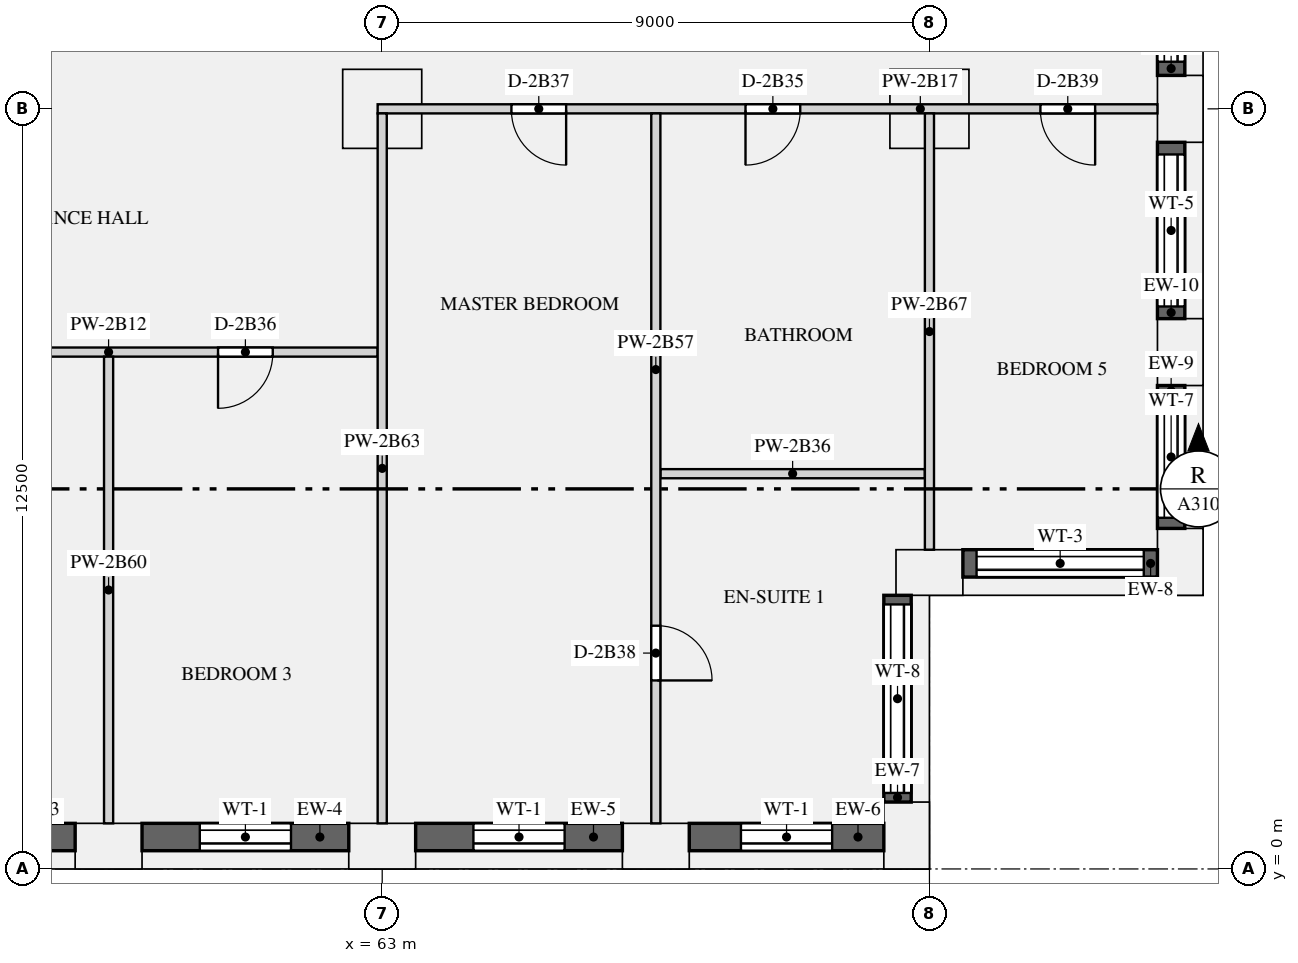
"""IFC4 building model, lengths in metres.
Left out: names, types, materials, properties, quantities, classifications, styles, units other than length and angle.
Written with IfcOpenShell. Run it as: python <this file> out.ifc"""

import sys

from ifc_helpers import new_model, si_unit, direction, frame, frame_2d, origin, origin_2d, place, context, subcontext, project, spatial, rectangle, extrude, element, fill, save


model = new_model("IFC4")
c1 = context("Model", 3, precision=1e-05, world=origin(), true_north=direction((0.0, 1.0)))
c2 = subcontext(c1, "Body", "Model", "MODEL_VIEW")
j1 = project(units=[si_unit("LENGTHUNIT", "METRE"), si_unit("PLANEANGLEUNIT", "RADIAN")], contexts=[c1])
p1 = place(None, origin())
s1 = spatial("IfcSite", under=j1, at=p1, CompositionType="ELEMENT")
p2 = place(p1, origin())
s2 = spatial("IfcBuilding", under=s1, at=p2, CompositionType="ELEMENT")
p3 = place(p2, frame((0.0, 0.0, 93.0)))
s3 = spatial("IfcBuildingStorey", under=s2, at=p3, CompositionType="ELEMENT", Elevation=93.0)
for number, where, z_axis, x_axis in (
    (1, (58.5, 0.375, 0.0), (0.0, 0.0, 1.0), (1.0, 0.0, 0.0)),
    (2, (63.0, 0.375, 0.0), (0.0, 0.0, 1.0), (1.0, 0.0, 0.0)),
    (3, (67.5, 0.375, 0.0), (0.0, 0.0, 1.0), (1.0, 0.0, 0.0)),
    (4, (71.625, 0.55, 0.0), (0.0, 0.0, 1.0), (0.0, 1.0, 0.0)),
    (5, (72.0, 4.875, 0.0), (0.0, 0.0, 1.0), (1.0, 0.0, 0.0)),
    (6, (76.125, 5.05, 0.0), (0.0, 0.0, 1.0), (0.0, 1.0, 0.0)),
    (7, (76.125, 8.5, 0.0), (0.0, 0.0, 1.0), (0.0, 1.0, 0.0)),
    (8, (76.125, 12.5, 0.0), (0.0, 0.0, 1.0), (0.0, 1.0, 0.0)),
):
    element("IfcColumn", number, at=place(p3, frame(where, z_axis=z_axis, x_axis=x_axis)), inside=s3, PredefinedType="USERDEFINED", context=c2, shape_type="SweptSolid", body=[
        extrude(rectangle(XDim=1.1, YDim=0.75, at=origin_2d()), origin(), (0.0, 0.0, 1.0), 3.15),
    ])
for number, where, z_axis, x_axis in (
    (9, (63.0, 12.5, 0.0), (0.0, 0.0, 1.0), (1.0, 0.0, 0.0)),
    (10, (72.0, 12.5, 0.0), (0.0, 0.0, 1.0), (1.0, 0.0, 0.0)),
):
    element("IfcColumn", number, at=place(p3, frame(where, z_axis=z_axis, x_axis=x_axis)), inside=s3, PredefinedType="COLUMN", context=c2, shape_type="SweptSolid", body=[
        extrude(rectangle(XDim=1.3, YDim=1.3, at=origin_2d()), origin(), (0.0, 0.0, 1.0), 3.15),
    ])
p4 = place(p3, frame((54.0, 0.525, 0.9), z_axis=(0.0, 0.0, 1.0), x_axis=(1.0, 0.0, 0.0)))
e11 = element("IfcWall", 11, at=p4, inside=s3, PredefinedType="SOLIDWALL", context=c2, shape_type="SweptSolid", body=[
    extrude(rectangle(XDim=3.95, YDim=0.45, at=frame_2d((1.975, 0.0))), origin(), (0.0, 0.0, 1.0), 1.93),
])
p5 = place(p4, frame((1.225, 0.0, 0.15)))
e12 = element("IfcOpeningElement", 12, at=p5, cuts=e11, PredefinedType="OPENING", context=c2, shape_type="SweptSolid", body=[
    extrude(rectangle(XDim=1.5, YDim=1.5, at=frame_2d((0.75, 0.75))), frame((0.0, 0.235, 0.0), z_axis=(0.0, -1.0, 0.0), x_axis=(1.0, 0.0, 0.0)), (0.0, 0.0, 1.0), 0.47),
])
p6 = place(p3, frame((59.05, 0.525, 0.9), z_axis=(0.0, 0.0, 1.0), x_axis=(1.0, 0.0, 0.0)))
e13 = element("IfcWall", 13, at=p6, inside=s3, PredefinedType="SOLIDWALL", context=c2, shape_type="SweptSolid", body=[
    extrude(rectangle(XDim=3.4, YDim=0.45, at=frame_2d((1.7, 0.0))), origin(), (0.0, 0.0, 1.0), 1.93),
])
p7 = place(p6, frame((0.95, 0.0, 0.15)))
e14 = element("IfcOpeningElement", 14, at=p7, cuts=e13, PredefinedType="OPENING", context=c2, shape_type="SweptSolid", body=[
    extrude(rectangle(XDim=1.5, YDim=1.5, at=frame_2d((0.75, 0.75))), frame((0.0, 0.235, 0.0), z_axis=(0.0, -1.0, 0.0), x_axis=(1.0, 0.0, 0.0)), (0.0, 0.0, 1.0), 0.47),
])
p8 = place(p3, frame((63.55, 0.525, 0.9), z_axis=(0.0, 0.0, 1.0), x_axis=(1.0, 0.0, 0.0)))
e15 = element("IfcWall", 15, at=p8, inside=s3, PredefinedType="SOLIDWALL", context=c2, shape_type="SweptSolid", body=[
    extrude(rectangle(XDim=3.4, YDim=0.45, at=frame_2d((1.7, 0.0))), origin(), (0.0, 0.0, 1.0), 1.93),
])
p9 = place(p8, frame((0.95, 0.0, 0.15)))
e16 = element("IfcOpeningElement", 16, at=p9, cuts=e15, PredefinedType="OPENING", context=c2, shape_type="SweptSolid", body=[
    extrude(rectangle(XDim=1.5, YDim=1.5, at=frame_2d((0.75, 0.75))), frame((0.0, 0.235, 0.0), z_axis=(0.0, -1.0, 0.0), x_axis=(1.0, 0.0, 0.0)), (0.0, 0.0, 1.0), 0.47),
])
p10 = place(p3, frame((68.05, 0.525, 0.9), z_axis=(0.0, 0.0, 1.0), x_axis=(1.0, 0.0, 0.0)))
e17 = element("IfcWall", 17, at=p10, inside=s3, PredefinedType="SOLIDWALL", context=c2, shape_type="SweptSolid", body=[
    extrude(rectangle(XDim=3.2, YDim=0.45, at=frame_2d((1.6, 0.0))), origin(), (0.0, 0.0, 1.0), 1.93),
])
p11 = place(p10, frame((0.85, 0.0, 0.15)))
e18 = element("IfcOpeningElement", 18, at=p11, cuts=e17, PredefinedType="OPENING", context=c2, shape_type="SweptSolid", body=[
    extrude(rectangle(XDim=1.5, YDim=1.5, at=frame_2d((0.75, 0.75))), frame((0.0, 0.235, 0.0), z_axis=(0.0, -1.0, 0.0), x_axis=(1.0, 0.0, 0.0)), (0.0, 0.0, 1.0), 0.47),
])
p12 = place(p3, frame((71.475, 1.1, 0.9), z_axis=(0.0, 0.0, 1.0), x_axis=(0.0, 1.0, 0.0)))
e19 = element("IfcWall", 19, at=p12, inside=s3, PredefinedType="SOLIDWALL", context=c2, shape_type="SweptSolid", body=[
    extrude(rectangle(XDim=3.4, YDim=0.45, at=frame_2d((1.7, 0.0))), origin(), (0.0, 0.0, 1.0), 1.93),
])
p13 = place(p12, frame((0.15, 0.0, 0.15)))
e20 = element("IfcOpeningElement", 20, at=p13, cuts=e19, PredefinedType="OPENING", context=c2, shape_type="SweptSolid", body=[
    extrude(rectangle(XDim=3.1, YDim=1.5, at=frame_2d((1.55, 0.75))), frame((0.0, 0.235, 0.0), z_axis=(0.0, -1.0, 0.0), x_axis=(1.0, 0.0, 0.0)), (0.0, 0.0, 1.0), 0.47),
])
p14 = place(p3, frame((72.55, 5.025, 0.9), z_axis=(0.0, 0.0, 1.0), x_axis=(1.0, 0.0, 0.0)))
e21 = element("IfcWall", 21, at=p14, inside=s3, PredefinedType="SOLIDWALL", context=c2, shape_type="SweptSolid", body=[
    extrude(rectangle(XDim=3.2, YDim=0.45, at=frame_2d((1.6, 0.0))), origin(), (0.0, 0.0, 1.0), 1.93),
])
p15 = place(p14, frame((0.225, 0.0, 0.15)))
e22 = element("IfcOpeningElement", 22, at=p15, cuts=e21, PredefinedType="OPENING", context=c2, shape_type="SweptSolid", body=[
    extrude(rectangle(XDim=2.75, YDim=1.5, at=frame_2d((1.375, 0.75))), frame((0.0, 0.235, 0.0), z_axis=(0.0, -1.0, 0.0), x_axis=(1.0, 0.0, 0.0)), (0.0, 0.0, 1.0), 0.47),
])
p16 = place(p3, frame((75.975, 5.6, 0.9), z_axis=(0.0, 0.0, 1.0), x_axis=(0.0, 1.0, 0.0)))
e23 = element("IfcWall", 23, at=p16, inside=s3, PredefinedType="SOLIDWALL", context=c2, shape_type="SweptSolid", body=[
    extrude(rectangle(XDim=2.35, YDim=0.45, at=frame_2d((1.175, 0.0))), origin(), (0.0, 0.0, 1.0), 1.93),
])
p17 = place(p16, frame((0.175, 0.0, 0.15)))
e24 = element("IfcOpeningElement", 24, at=p17, cuts=e23, PredefinedType="OPENING", context=c2, shape_type="SweptSolid", body=[
    extrude(rectangle(XDim=2.0, YDim=1.5, at=frame_2d((1.0, 0.75))), frame((0.0, 0.235, 0.0), z_axis=(0.0, -1.0, 0.0), x_axis=(1.0, 0.0, 0.0)), (0.0, 0.0, 1.0), 0.47),
])
p18 = place(p3, frame((75.975, 9.05, 0.9), z_axis=(0.0, 0.0, 1.0), x_axis=(0.0, 1.0, 0.0)))
e25 = element("IfcWall", 25, at=p18, inside=s3, PredefinedType="SOLIDWALL", context=c2, shape_type="SweptSolid", body=[
    extrude(rectangle(XDim=2.9, YDim=0.45, at=frame_2d((1.45, 0.0))), origin(), (0.0, 0.0, 1.0), 1.93),
])
p19 = place(p18, frame((0.2, 0.0, 0.15)))
e26 = element("IfcOpeningElement", 26, at=p19, cuts=e25, PredefinedType="OPENING", context=c2, shape_type="SweptSolid", body=[
    extrude(rectangle(XDim=2.5, YDim=1.5, at=frame_2d((1.25, 0.75))), frame((0.0, 0.235, 0.0), z_axis=(0.0, -1.0, 0.0), x_axis=(1.0, 0.0, 0.0)), (0.0, 0.0, 1.0), 0.47),
])
p20 = place(p3, frame((75.975, 13.05, 0.9), z_axis=(0.0, 0.0, 1.0), x_axis=(0.0, 1.0, 0.0)))
e27 = element("IfcWall", 27, at=p20, inside=s3, PredefinedType="SOLIDWALL", context=c2, shape_type="SweptSolid", body=[
    extrude(rectangle(XDim=2.7, YDim=0.45, at=frame_2d((1.35, 0.0))), origin(), (0.0, 0.0, 1.0), 1.93),
])
p21 = place(p20, frame((0.225, 0.0, 0.15)))
e28 = element("IfcOpeningElement", 28, at=p21, cuts=e27, PredefinedType="OPENING", context=c2, shape_type="SweptSolid", body=[
    extrude(rectangle(XDim=2.25, YDim=1.5, at=frame_2d((1.125, 0.75))), frame((0.0, 0.235, 0.0), z_axis=(0.0, -1.0, 0.0), x_axis=(1.0, 0.0, 0.0)), (0.0, 0.0, 1.0), 0.47),
])
p22 = place(p3, frame((54.0, 8.5, 0.0), z_axis=(0.0, 0.0, 1.0), x_axis=(1.0, 0.0, 0.0)))
e29 = element("IfcWall", 29, at=p22, inside=s3, PredefinedType="PARTITIONING", context=c2, shape_type="SweptSolid", body=[
    extrude(rectangle(XDim=8.925, YDim=0.15, at=frame_2d((4.462, 0.0))), origin(), (0.0, 0.0, 1.0), 2.83),
])
p23 = place(p22, frame((1.8, 0.0, 0.0)))
e30 = element("IfcOpeningElement", 30, at=p23, cuts=e29, PredefinedType="OPENING", context=c2, shape_type="SweptSolid", body=[
    extrude(rectangle(XDim=0.9, YDim=2.1, at=frame_2d((0.45, 1.05))), frame((0.0, 0.085, 0.0), z_axis=(0.0, -1.0, 0.0), x_axis=(1.0, 0.0, 0.0)), (0.0, 0.0, 1.0), 0.17),
])
p24 = place(p22, frame((6.3, 0.0, 0.0)))
e31 = element("IfcOpeningElement", 31, at=p24, cuts=e29, PredefinedType="OPENING", context=c2, shape_type="SweptSolid", body=[
    extrude(rectangle(XDim=0.9, YDim=2.1, at=frame_2d((0.45, 1.05))), frame((0.0, 0.085, 0.0), z_axis=(0.0, -1.0, 0.0), x_axis=(1.0, 0.0, 0.0)), (0.0, 0.0, 1.0), 0.17),
])
p25 = place(p3, frame((62.925, 12.5, 0.0), z_axis=(0.0, 0.0, 1.0), x_axis=(1.0, 0.0, 0.0)))
e32 = element("IfcWall", 32, at=p25, inside=s3, PredefinedType="PARTITIONING", context=c2, shape_type="SweptSolid", body=[
    extrude(rectangle(XDim=12.825, YDim=0.15, at=frame_2d((6.413, 0.0))), origin(), (0.0, 0.0, 1.0), 2.83),
])
p26 = place(p25, frame((6.05, 0.0, 0.0)))
e33 = element("IfcOpeningElement", 33, at=p26, cuts=e32, PredefinedType="OPENING", context=c2, shape_type="SweptSolid", body=[
    extrude(rectangle(XDim=0.9, YDim=2.1, at=frame_2d((0.45, 1.05))), frame((0.0, 0.085, 0.0), z_axis=(0.0, -1.0, 0.0), x_axis=(1.0, 0.0, 0.0)), (0.0, 0.0, 1.0), 0.17),
])
p27 = place(p25, frame((2.2, 0.0, 0.0)))
e34 = element("IfcOpeningElement", 34, at=p27, cuts=e32, PredefinedType="OPENING", context=c2, shape_type="SweptSolid", body=[
    extrude(rectangle(XDim=0.9, YDim=2.1, at=frame_2d((0.45, 1.05))), frame((0.0, 0.085, 0.0), z_axis=(0.0, -1.0, 0.0), x_axis=(1.0, 0.0, 0.0)), (0.0, 0.0, 1.0), 0.17),
])
p28 = place(p25, frame((10.9, 0.0, 0.0)))
e35 = element("IfcOpeningElement", 35, at=p28, cuts=e32, PredefinedType="OPENING", context=c2, shape_type="SweptSolid", body=[
    extrude(rectangle(XDim=0.9, YDim=2.1, at=frame_2d((0.45, 1.05))), frame((0.0, 0.085, 0.0), z_axis=(0.0, -1.0, 0.0), x_axis=(1.0, 0.0, 0.0)), (0.0, 0.0, 1.0), 0.17),
])
p29 = place(p3, frame((67.575, 6.5, 0.0), z_axis=(0.0, 0.0, 1.0), x_axis=(1.0, 0.0, 0.0)))
e36 = element("IfcWall", 36, at=p29, inside=s3, PredefinedType="PARTITIONING", context=c2, shape_type="SweptSolid", body=[
    extrude(rectangle(XDim=4.35, YDim=0.15, at=frame_2d((2.175, 0.0))), origin(), (0.0, 0.0, 1.0), 2.83),
])
p30 = place(p3, frame((67.5, 0.75, 0.0), z_axis=(0.0, 0.0, 1.0), x_axis=(0.0, 1.0, 0.0)))
e37 = element("IfcWall", 37, at=p30, inside=s3, PredefinedType="PARTITIONING", context=c2, shape_type="SweptSolid", body=[
    extrude(rectangle(XDim=11.675, YDim=0.15, at=frame_2d((5.837, 0.0))), origin(), (0.0, 0.0, 1.0), 2.83),
])
p31 = place(p30, frame((2.35, 0.0, 0.0)))
e38 = element("IfcOpeningElement", 38, at=p31, cuts=e37, PredefinedType="OPENING", context=c2, shape_type="SweptSolid", body=[
    extrude(rectangle(XDim=0.9, YDim=2.1, at=frame_2d((0.45, 1.05))), frame((0.0, 0.085, 0.0), z_axis=(0.0, -1.0, 0.0), x_axis=(1.0, 0.0, 0.0)), (0.0, 0.0, 1.0), 0.17),
])
p32 = place(p3, frame((58.5, 0.75, 0.0), z_axis=(0.0, 0.0, 1.0), x_axis=(0.0, 1.0, 0.0)))
e39 = element("IfcWall", 39, at=p32, inside=s3, PredefinedType="PARTITIONING", context=c2, shape_type="SweptSolid", body=[
    extrude(rectangle(XDim=7.675, YDim=0.15, at=frame_2d((3.837, 0.0))), origin(), (0.0, 0.0, 1.0), 2.83),
])
p33 = place(p3, frame((63.0, 0.75, 0.0), z_axis=(0.0, 0.0, 1.0), x_axis=(0.0, 1.0, 0.0)))
e40 = element("IfcWall", 40, at=p33, inside=s3, PredefinedType="PARTITIONING", context=c2, shape_type="SweptSolid", body=[
    extrude(rectangle(XDim=11.675, YDim=0.15, at=frame_2d((5.837, 0.0))), origin(), (0.0, 0.0, 1.0), 2.83),
])
p34 = place(p3, frame((72.0, 5.25, 0.0), z_axis=(0.0, 0.0, 1.0), x_axis=(0.0, 1.0, 0.0)))
e41 = element("IfcWall", 41, at=p34, inside=s3, PredefinedType="PARTITIONING", context=c2, shape_type="SweptSolid", body=[
    extrude(rectangle(XDim=7.175, YDim=0.15, at=frame_2d((3.587, 0.0))), origin(), (0.0, 0.0, 1.0), 2.83),
])
p35 = place(p7, origin())
e42 = element("IfcWindow", 42, at=p35, inside=s3, PartitioningType="SINGLE_PANEL", PredefinedType="WINDOW", context=c2, shape_type="SweptSolid", body=[
    extrude(rectangle(XDim=1.5, YDim=1.5, at=frame_2d((0.75, 0.75))), frame((0.0, -0.065, 0.0), z_axis=(0.0, -1.0, 0.0), x_axis=(1.0, 0.0, 0.0)), (0.0, 0.0, 1.0), 0.06),
])
fill(e14, e42)
p36 = place(p9, origin())
e43 = element("IfcWindow", 43, at=p36, inside=s3, PartitioningType="SINGLE_PANEL", PredefinedType="WINDOW", context=c2, shape_type="SweptSolid", body=[
    extrude(rectangle(XDim=1.5, YDim=1.5, at=frame_2d((0.75, 0.75))), frame((0.0, -0.065, 0.0), z_axis=(0.0, -1.0, 0.0), x_axis=(1.0, 0.0, 0.0)), (0.0, 0.0, 1.0), 0.06),
])
fill(e16, e43)
p37 = place(p11, origin())
e44 = element("IfcWindow", 44, at=p37, inside=s3, PartitioningType="SINGLE_PANEL", PredefinedType="WINDOW", context=c2, shape_type="SweptSolid", body=[
    extrude(rectangle(XDim=1.5, YDim=1.5, at=frame_2d((0.75, 0.75))), frame((0.0, -0.065, 0.0), z_axis=(0.0, -1.0, 0.0), x_axis=(1.0, 0.0, 0.0)), (0.0, 0.0, 1.0), 0.06),
])
fill(e18, e44)
p38 = place(p13, origin())
e45 = element("IfcWindow", 45, at=p38, inside=s3, PartitioningType="SINGLE_PANEL", PredefinedType="WINDOW", context=c2, shape_type="SweptSolid", body=[
    extrude(rectangle(XDim=3.1, YDim=1.5, at=frame_2d((1.55, 0.75))), frame((0.0, -0.065, 0.0), z_axis=(0.0, -1.0, 0.0), x_axis=(1.0, 0.0, 0.0)), (0.0, 0.0, 1.0), 0.06),
])
fill(e20, e45)
p39 = place(p15, origin())
e46 = element("IfcWindow", 46, at=p39, inside=s3, PartitioningType="SINGLE_PANEL", PredefinedType="WINDOW", context=c2, shape_type="SweptSolid", body=[
    extrude(rectangle(XDim=2.75, YDim=1.5, at=frame_2d((1.375, 0.75))), frame((0.0, -0.065, 0.0), z_axis=(0.0, -1.0, 0.0), x_axis=(1.0, 0.0, 0.0)), (0.0, 0.0, 1.0), 0.06),
])
fill(e22, e46)
p40 = place(p17, origin())
e47 = element("IfcWindow", 47, at=p40, inside=s3, PartitioningType="SINGLE_PANEL", PredefinedType="WINDOW", context=c2, shape_type="SweptSolid", body=[
    extrude(rectangle(XDim=2.0, YDim=1.5, at=frame_2d((1.0, 0.75))), frame((0.0, -0.065, 0.0), z_axis=(0.0, -1.0, 0.0), x_axis=(1.0, 0.0, 0.0)), (0.0, 0.0, 1.0), 0.06),
])
fill(e24, e47)
p41 = place(p19, origin())
e48 = element("IfcWindow", 48, at=p41, inside=s3, PartitioningType="SINGLE_PANEL", PredefinedType="WINDOW", context=c2, shape_type="SweptSolid", body=[
    extrude(rectangle(XDim=2.5, YDim=1.5, at=frame_2d((1.25, 0.75))), frame((0.0, -0.065, 0.0), z_axis=(0.0, -1.0, 0.0), x_axis=(1.0, 0.0, 0.0)), (0.0, 0.0, 1.0), 0.06),
])
fill(e26, e48)
p42 = place(p21, origin())
e49 = element("IfcWindow", 49, at=p42, inside=s3, PartitioningType="SINGLE_PANEL", PredefinedType="WINDOW", context=c2, shape_type="SweptSolid", body=[
    extrude(rectangle(XDim=2.25, YDim=1.5, at=frame_2d((1.125, 0.75))), frame((0.0, -0.065, 0.0), z_axis=(0.0, -1.0, 0.0), x_axis=(1.0, 0.0, 0.0)), (0.0, 0.0, 1.0), 0.06),
])
fill(e28, e49)
p43 = place(p26, frame((0.9, 0.0, 0.0), z_axis=(0.0, 0.0, 1.0), x_axis=(-1.0, 0.0, 0.0)))
e50 = element("IfcDoor", 50, at=p43, inside=s3, OperationType="SINGLE_SWING_RIGHT", PredefinedType="DOOR", context=c2, shape_type="SweptSolid", body=[
    extrude(rectangle(XDim=0.9, YDim=2.1, at=frame_2d((0.45, 1.05))), frame((0.0, 0.025, 0.0), z_axis=(0.0, -1.0, 0.0), x_axis=(1.0, 0.0, 0.0)), (0.0, 0.0, 1.0), 0.05),
])
fill(e33, e50)
p44 = place(p24, frame((0.9, 0.0, 0.0), z_axis=(0.0, 0.0, 1.0), x_axis=(-1.0, 0.0, 0.0)))
e51 = element("IfcDoor", 51, at=p44, inside=s3, OperationType="SINGLE_SWING_RIGHT", PredefinedType="DOOR", context=c2, shape_type="SweptSolid", body=[
    extrude(rectangle(XDim=0.9, YDim=2.1, at=frame_2d((0.45, 1.05))), frame((0.0, 0.025, 0.0), z_axis=(0.0, -1.0, 0.0), x_axis=(1.0, 0.0, 0.0)), (0.0, 0.0, 1.0), 0.05),
])
fill(e31, e51)
p45 = place(p27, frame((0.9, 0.0, 0.0), z_axis=(0.0, 0.0, 1.0), x_axis=(-1.0, 0.0, 0.0)))
e52 = element("IfcDoor", 52, at=p45, inside=s3, OperationType="SINGLE_SWING_LEFT", PredefinedType="DOOR", context=c2, shape_type="SweptSolid", body=[
    extrude(rectangle(XDim=0.9, YDim=2.1, at=frame_2d((0.45, 1.05))), frame((0.0, 0.025, 0.0), z_axis=(0.0, -1.0, 0.0), x_axis=(1.0, 0.0, 0.0)), (0.0, 0.0, 1.0), 0.05),
])
fill(e34, e52)
p46 = place(p31, frame((0.9, 0.0, 0.0), z_axis=(0.0, 0.0, 1.0), x_axis=(-1.0, 0.0, 0.0)))
e53 = element("IfcDoor", 53, at=p46, inside=s3, OperationType="SINGLE_SWING_RIGHT", PredefinedType="DOOR", context=c2, shape_type="SweptSolid", body=[
    extrude(rectangle(XDim=0.9, YDim=2.1, at=frame_2d((0.45, 1.05))), frame((0.0, 0.025, 0.0), z_axis=(0.0, -1.0, 0.0), x_axis=(1.0, 0.0, 0.0)), (0.0, 0.0, 1.0), 0.05),
])
fill(e38, e53)
p47 = place(p28, frame((0.9, 0.0, 0.0), z_axis=(0.0, 0.0, 1.0), x_axis=(-1.0, 0.0, 0.0)))
e54 = element("IfcDoor", 54, at=p47, inside=s3, OperationType="SINGLE_SWING_LEFT", PredefinedType="DOOR", context=c2, shape_type="SweptSolid", body=[
    extrude(rectangle(XDim=0.9, YDim=2.1, at=frame_2d((0.45, 1.05))), frame((0.0, 0.025, 0.0), z_axis=(0.0, -1.0, 0.0), x_axis=(1.0, 0.0, 0.0)), (0.0, 0.0, 1.0), 0.05),
])
fill(e35, e54)
save(model, sys.argv[1])
